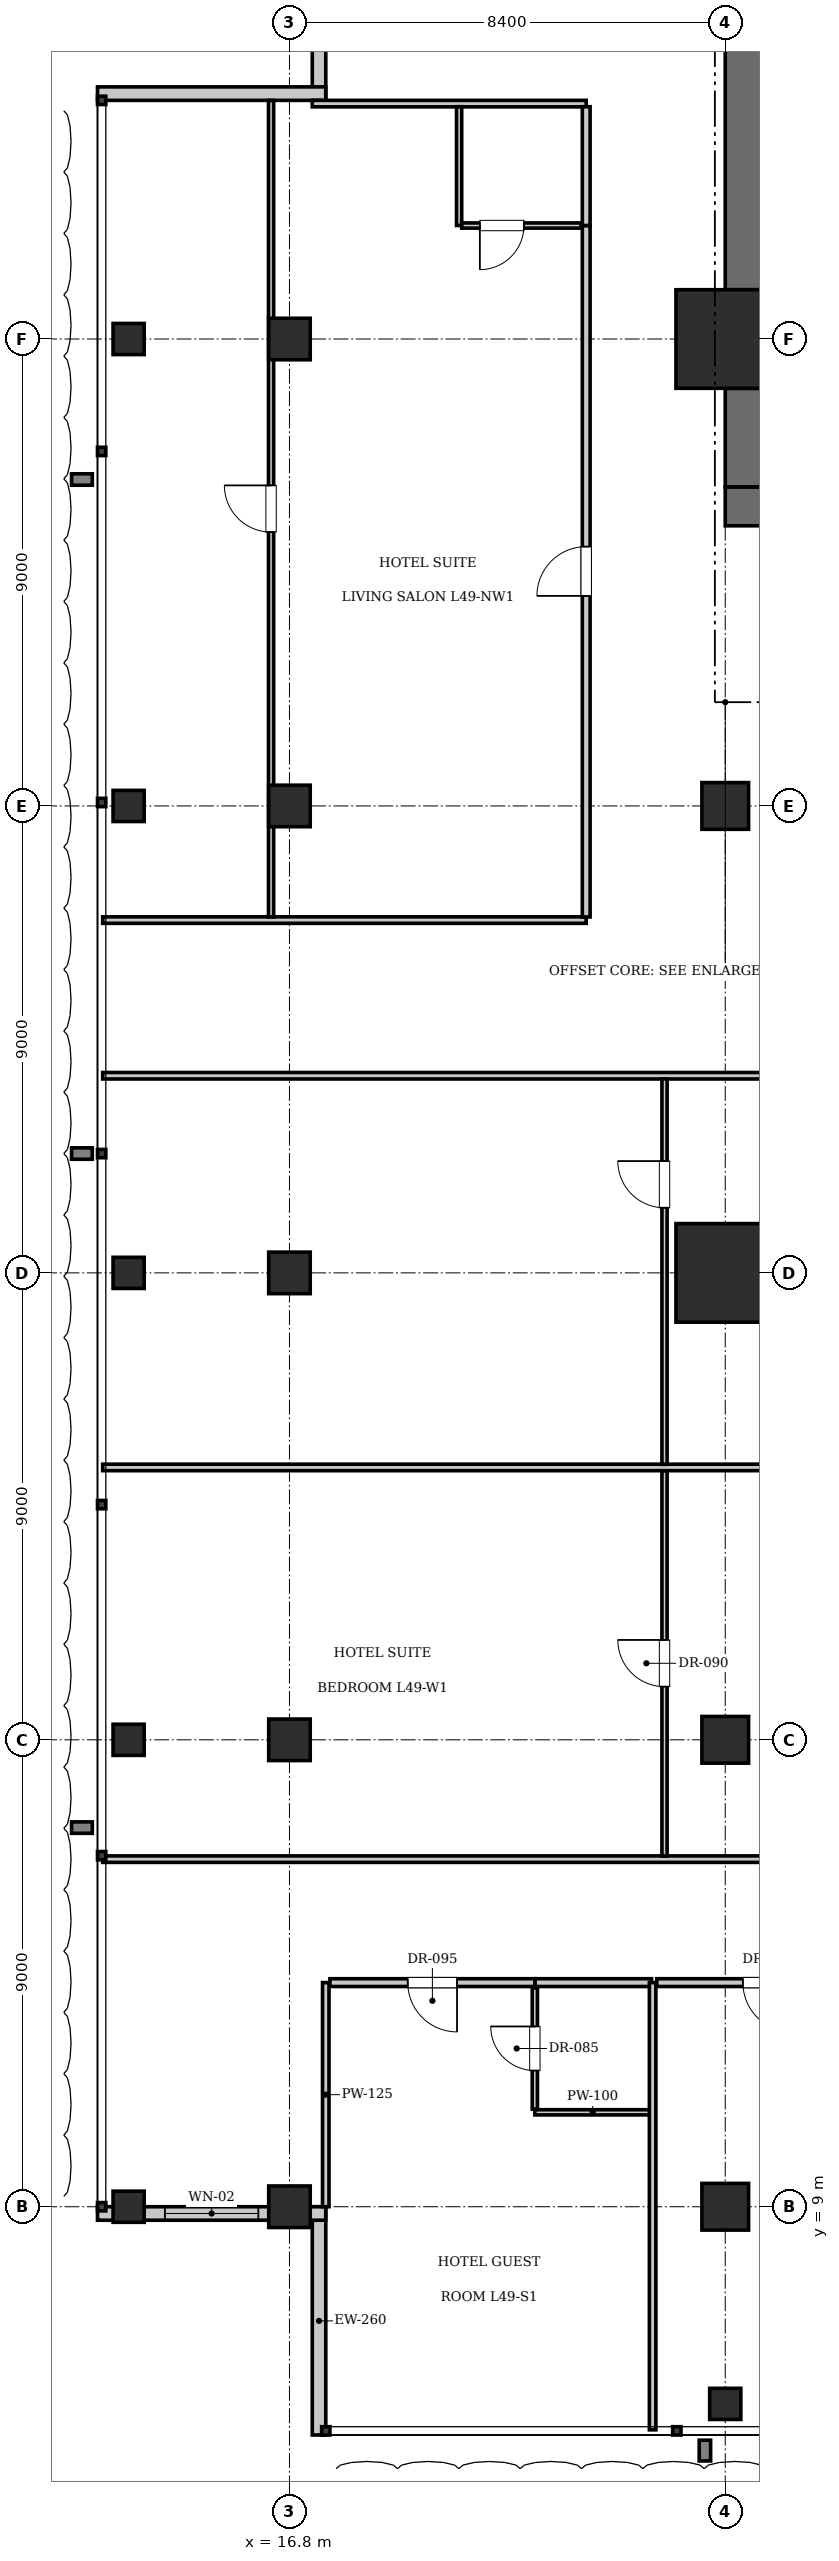
"""IFC4 building model, lengths in metres.
Left out: names, types, materials, properties, quantities, classifications, styles, units other than length and angle.
Written with IfcOpenShell. Run it as: python <this file> out.ifc"""

import sys

from ifc_helpers import new_model, si_unit, direction, frame, frame_2d, origin, origin_2d, place, context, subcontext, project, spatial, rectangle, i_section, extrude, element, fill, save


model = new_model("IFC4")
c1 = context("Model", 3, precision=1e-05, world=origin(), true_north=direction((0.0, 1.0)))
c2 = subcontext(c1, "Body", "Model", "MODEL_VIEW")
j1 = project(units=[si_unit("LENGTHUNIT", "METRE"), si_unit("PLANEANGLEUNIT", "RADIAN")], contexts=[c1])
p1 = place(None, origin())
s1 = spatial("IfcSite", under=j1, at=p1, CompositionType="ELEMENT")
p2 = place(p1, origin())
s2 = spatial("IfcBuilding", under=s1, at=p2, CompositionType="ELEMENT")
p3 = place(p2, frame((0.0, 0.0, 200.55)))
s3 = spatial("IfcBuildingStorey", under=s2, at=p3, CompositionType="ELEMENT", Elevation=200.55)
for number, where, z_axis, x_axis in (
    (1, (25.2, 27.0, 0.0), (0.0, 0.0, 1.0), (1.0, 0.0, 0.0)),
    (2, (25.2, 45.0, 0.0), (0.0, 0.0, 1.0), (1.0, 0.0, 0.0)),
):
    element("IfcColumn", number, at=place(p3, frame(where, z_axis=z_axis, x_axis=x_axis)), inside=s3, PredefinedType="COLUMN", context=c2, shape_type="SweptSolid", body=[
        extrude(rectangle(XDim=1.9, YDim=1.9, at=origin_2d()), origin(), (0.0, 0.0, 1.0), 3.85),
    ])
p4 = place(p3, frame((25.2, 41.775, 0.0), z_axis=(0.0, 0.0, 1.0), x_axis=(1.0, 0.0, 0.0)))
e3 = element("IfcWall", 3, at=p4, inside=s3, PredefinedType="SHEAR", context=c2, shape_type="SweptSolid", body=[
    extrude(rectangle(XDim=6.8, YDim=0.75, at=frame_2d((3.4, 0.0))), origin(), (0.0, 0.0, 1.0), 3.85),
])
p5 = place(p4, frame((1.65, 0.0, 0.0)))
e4 = element("IfcOpeningElement", 4, at=p5, cuts=e3, PredefinedType="OPENING", context=c2, shape_type="SweptSolid", body=[
    extrude(rectangle(XDim=1.15, YDim=2.15, at=frame_2d((0.575, 1.075))), frame((0.0, 0.385, 0.0), z_axis=(0.0, -1.0, 0.0), x_axis=(1.0, 0.0, 0.0)), (0.0, 0.0, 1.0), 0.77),
])
p6 = place(p4, frame((5.15, 0.0, 0.0)))
e5 = element("IfcOpeningElement", 5, at=p6, cuts=e3, PredefinedType="OPENING", context=c2, shape_type="SweptSolid", body=[
    extrude(rectangle(XDim=1.1, YDim=2.2, at=frame_2d((0.55, 1.1))), frame((0.0, 0.385, 0.0), z_axis=(0.0, -1.0, 0.0), x_axis=(1.0, 0.0, 0.0)), (0.0, 0.0, 1.0), 0.77),
])
p7 = place(p3, frame((25.575, 42.15, 0.0), z_axis=(0.0, 0.0, 1.0), x_axis=(0.0, 1.0, 0.0)))
e6 = element("IfcWall", 6, at=p7, inside=s3, PredefinedType="SHEAR", context=c2, shape_type="SweptSolid", body=[
    extrude(rectangle(XDim=1.9, YDim=0.75, at=frame_2d((0.95, 0.0))), origin(), (0.0, 0.0, 1.0), 3.85),
])
p8 = place(p3, frame((25.575, 45.95, 0.0), z_axis=(0.0, 0.0, 1.0), x_axis=(0.0, 1.0, 0.0)))
e7 = element("IfcWall", 7, at=p8, inside=s3, PredefinedType="SHEAR", context=c2, shape_type="SweptSolid", body=[
    extrude(rectangle(XDim=7.3, YDim=0.75, at=frame_2d((3.65, 0.0))), origin(), (0.0, 0.0, 1.0), 3.85),
])
for number, where, z_axis, x_axis in (
    (8, (25.2, 36.0, 0.0), (0.0, 0.0, 1.0), (1.0, 0.0, 0.0)),
    (9, (25.2, 18.0, 0.0), (0.0, 0.0, 1.0), (1.0, 0.0, 0.0)),
    (10, (25.2, 9.0, 0.0), (0.0, 0.0, 1.0), (1.0, 0.0, 0.0)),
):
    element("IfcColumn", number, at=place(p3, frame(where, z_axis=z_axis, x_axis=x_axis)), inside=s3, PredefinedType="COLUMN", context=c2, shape_type="SweptSolid", body=[
        extrude(rectangle(XDim=0.9, YDim=0.9, at=origin_2d()), origin(), (0.0, 0.0, 1.0), 3.85),
    ])
for number, where, z_axis, x_axis in (
    (11, (16.8, 9.0, 0.0), (0.0, 0.0, 1.0), (1.0, 0.0, 0.0)),
    (12, (16.8, 18.0, 0.0), (0.0, 0.0, 1.0), (1.0, 0.0, 0.0)),
    (13, (16.8, 27.0, 0.0), (0.0, 0.0, 1.0), (1.0, 0.0, 0.0)),
    (14, (16.8, 36.0, 0.0), (0.0, 0.0, 1.0), (1.0, 0.0, 0.0)),
    (15, (16.8, 45.0, 0.0), (0.0, 0.0, 1.0), (1.0, 0.0, 0.0)),
):
    element("IfcColumn", number, at=place(p3, frame(where, z_axis=z_axis, x_axis=x_axis)), inside=s3, PredefinedType="COLUMN", context=c2, shape_type="SweptSolid", body=[
        extrude(rectangle(XDim=0.8, YDim=0.8, at=origin_2d()), origin(), (0.0, 0.0, 1.0), 3.85),
    ])
for number, where, z_axis, x_axis in (
    (16, (13.7, 9.0, 0.0), (0.0, 0.0, 1.0), (1.0, 0.0, 0.0)),
    (17, (13.7, 18.0, 0.0), (0.0, 0.0, 1.0), (1.0, 0.0, 0.0)),
    (18, (13.7, 27.0, 0.0), (0.0, 0.0, 1.0), (1.0, 0.0, 0.0)),
    (19, (13.7, 36.0, 0.0), (0.0, 0.0, 1.0), (1.0, 0.0, 0.0)),
    (20, (13.7, 45.0, 0.0), (0.0, 0.0, 1.0), (1.0, 0.0, 0.0)),
    (21, (25.2, 5.2, 0.0), (0.0, 0.0, 1.0), (1.0, 0.0, 0.0)),
):
    element("IfcColumn", number, at=place(p3, frame(where, z_axis=z_axis, x_axis=x_axis)), inside=s3, PredefinedType="COLUMN", context=c2, shape_type="SweptSolid", body=[
        extrude(i_section(OverallWidth=0.6, OverallDepth=0.6, WebThickness=0.025, FlangeThickness=0.038, at=origin_2d()), origin(), (0.0, 0.0, 1.0), 3.85),
    ])
p9 = place(p3, frame((17.37, 4.6, 0.0), z_axis=(0.0, 0.0, 1.0), x_axis=(0.0, 1.0, 0.0)))
e22 = element("IfcWall", 22, at=p9, inside=s3, PredefinedType="SOLIDWALL", context=c2, shape_type="SweptSolid", body=[
    extrude(rectangle(XDim=4.4, YDim=0.26, at=frame_2d((2.2, 0.0))), origin(), (0.0, 0.0, 1.0), 3.61),
])
p10 = place(p3, frame((17.5, 8.87, 0.0), z_axis=(0.0, 0.0, 1.0), x_axis=(-1.0, 0.0, 0.0)))
e23 = element("IfcWall", 23, at=p10, inside=s3, PredefinedType="SOLIDWALL", context=c2, shape_type="SweptSolid", body=[
    extrude(rectangle(XDim=4.4, YDim=0.26, at=frame_2d((2.2, 0.0))), origin(), (0.0, 0.0, 1.0), 3.071),
])
p11 = place(p10, frame((1.3, 0.0, 0.9)))
e24 = element("IfcOpeningElement", 24, at=p11, cuts=e23, PredefinedType="OPENING", context=c2, shape_type="SweptSolid", body=[
    extrude(rectangle(XDim=1.8, YDim=2.1, at=frame_2d((0.9, 1.05))), frame((0.0, 0.14, 0.0), z_axis=(0.0, -1.0, 0.0), x_axis=(1.0, 0.0, 0.0)), (0.0, 0.0, 1.0), 0.28),
])
for number, where, z_axis, x_axis in (
    (25, (17.37, 49.6, 0.0), (0.0, 0.0, 1.0), (0.0, 1.0, 0.0)),
    (26, (13.1, 49.73, 0.0), (0.0, 0.0, 1.0), (1.0, 0.0, 0.0)),
):
    element("IfcWall", number, at=place(p3, frame(where, z_axis=z_axis, x_axis=x_axis)), inside=s3, PredefinedType="SOLIDWALL", context=c2, shape_type="SweptSolid", body=[
        extrude(rectangle(XDim=4.4, YDim=0.26, at=frame_2d((2.2, 0.0))), origin(), (0.0, 0.0, 1.0), 3.61),
    ])
p12 = place(p3, frame((17.5, 9.0, 0.0), z_axis=(0.0, 0.0, 1.0), x_axis=(0.0, 1.0, 0.0)))
e27 = element("IfcWall", 27, at=p12, inside=s3, PredefinedType="PARTITIONING", context=c2, shape_type="SweptSolid", body=[
    extrude(rectangle(XDim=4.32, YDim=0.125, at=frame_2d((2.16, 0.0))), origin(), (0.0, 0.0, 1.0), 3.61),
])
p13 = place(p3, frame((21.53, 13.32, 0.0), z_axis=(0.0, 0.0, 1.0), x_axis=(1.0, 0.0, 0.0)))
e28 = element("IfcWall", 28, at=p13, inside=s3, PredefinedType="PARTITIONING", context=c2, shape_type="SweptSolid", body=[
    extrude(rectangle(XDim=2.25, YDim=0.15, at=frame_2d((1.125, 0.0))), origin(), (0.0, 0.0, 1.0), 3.61),
])
p14 = place(p3, frame((21.53, 10.82, 0.0), z_axis=(0.0, 0.0, 1.0), x_axis=(1.0, 0.0, 0.0)))
e29 = element("IfcWall", 29, at=p14, inside=s3, PredefinedType="PARTITIONING", context=c2, shape_type="SweptSolid", body=[
    extrude(rectangle(XDim=2.23, YDim=0.1, at=frame_2d((1.115, 0.0))), origin(), (0.0, 0.0, 1.0), 3.61),
])
p15 = place(p3, frame((21.53, 10.88, 0.0), z_axis=(0.0, 0.0, 1.0), x_axis=(0.0, 1.0, 0.0)))
e30 = element("IfcWall", 30, at=p15, inside=s3, PredefinedType="PARTITIONING", context=c2, shape_type="SweptSolid", body=[
    extrude(rectangle(XDim=2.34, YDim=0.1, at=frame_2d((1.17, 0.0))), origin(), (0.0, 0.0, 1.0), 3.61),
])
p16 = place(p15, frame((0.745, 0.0, 0.0)))
e31 = element("IfcOpeningElement", 31, at=p16, cuts=e30, PredefinedType="OPENING", context=c2, shape_type="SweptSolid", body=[
    extrude(rectangle(XDim=0.85, YDim=2.1, at=frame_2d((0.425, 1.05))), frame((0.0, 0.06, 0.0), z_axis=(0.0, -1.0, 0.0), x_axis=(1.0, 0.0, 0.0)), (0.0, 0.0, 1.0), 0.12),
])
p17 = place(p3, frame((17.58, 13.32, 0.0), z_axis=(0.0, 0.0, 1.0), x_axis=(1.0, 0.0, 0.0)))
e32 = element("IfcWall", 32, at=p17, inside=s3, PredefinedType="PARTITIONING", context=c2, shape_type="SweptSolid", body=[
    extrude(rectangle(XDim=3.95, YDim=0.15, at=frame_2d((1.975, 0.0))), origin(), (0.0, 0.0, 1.0), 3.61),
])
p18 = place(p17, frame((1.5, 0.0, 0.0)))
e33 = element("IfcOpeningElement", 33, at=p18, cuts=e32, PredefinedType="OPENING", context=c2, shape_type="SweptSolid", body=[
    extrude(rectangle(XDim=0.95, YDim=2.15, at=frame_2d((0.475, 1.075))), frame((0.0, 0.085, 0.0), z_axis=(0.0, -1.0, 0.0), x_axis=(1.0, 0.0, 0.0)), (0.0, 0.0, 1.0), 0.17),
])
p19 = place(p3, frame((23.8, 4.7, 0.0), z_axis=(0.0, 0.0, 1.0), x_axis=(0.0, 1.0, 0.0)))
e34 = element("IfcWall", 34, at=p19, inside=s3, PredefinedType="PARTITIONING", context=c2, shape_type="SweptSolid", body=[
    extrude(rectangle(XDim=8.62, YDim=0.125, at=frame_2d((4.31, 0.0))), origin(), (0.0, 0.0, 1.0), 3.61),
])
p20 = place(p3, frame((23.88, 13.32, 0.0), z_axis=(0.0, 0.0, 1.0), x_axis=(1.0, 0.0, 0.0)))
e35 = element("IfcWall", 35, at=p20, inside=s3, PredefinedType="PARTITIONING", context=c2, shape_type="SweptSolid", body=[
    extrude(rectangle(XDim=4.27, YDim=0.15, at=frame_2d((2.135, 0.0))), origin(), (0.0, 0.0, 1.0), 3.61),
])
p21 = place(p20, frame((1.66, 0.0, 0.0)))
e36 = element("IfcOpeningElement", 36, at=p21, cuts=e35, PredefinedType="OPENING", context=c2, shape_type="SweptSolid", body=[
    extrude(rectangle(XDim=0.95, YDim=2.15, at=frame_2d((0.475, 1.075))), frame((0.0, 0.085, 0.0), z_axis=(0.0, -1.0, 0.0), x_axis=(1.0, 0.0, 0.0)), (0.0, 0.0, 1.0), 0.17),
])
for number, where, z_axis, x_axis in (
    (37, (13.2, 15.7, 0.0), (0.0, 0.0, 1.0), (1.0, 0.0, 0.0)),
    (38, (13.2, 30.8, 0.0), (0.0, 0.0, 1.0), (1.0, 0.0, 0.0)),
):
    element("IfcWall", number, at=place(p3, frame(where, z_axis=z_axis, x_axis=x_axis)), inside=s3, PredefinedType="PARTITIONING", context=c2, shape_type="SweptSolid", body=[
        extrude(rectangle(XDim=25.12, YDim=0.125, at=frame_2d((12.56, 0.0))), origin(), (0.0, 0.0, 1.0), 3.61),
    ])
p22 = place(p3, frame((24.03, 15.76, 0.0), z_axis=(0.0, 0.0, 1.0), x_axis=(0.0, 1.0, 0.0)))
e39 = element("IfcWall", 39, at=p22, inside=s3, PredefinedType="PARTITIONING", context=c2, shape_type="SweptSolid", body=[
    extrude(rectangle(XDim=7.43, YDim=0.1, at=frame_2d((3.715, 0.0))), origin(), (0.0, 0.0, 1.0), 3.61),
])
p23 = place(p22, frame((3.265, 0.0, 0.0)))
e40 = element("IfcOpeningElement", 40, at=p23, cuts=e39, PredefinedType="OPENING", context=c2, shape_type="SweptSolid", body=[
    extrude(rectangle(XDim=0.9, YDim=2.1, at=frame_2d((0.45, 1.05))), frame((0.0, 0.06, 0.0), z_axis=(0.0, -1.0, 0.0), x_axis=(1.0, 0.0, 0.0)), (0.0, 0.0, 1.0), 0.12),
])
p24 = place(p3, frame((13.2, 23.25, 0.0), z_axis=(0.0, 0.0, 1.0), x_axis=(1.0, 0.0, 0.0)))
e41 = element("IfcWall", 41, at=p24, inside=s3, PredefinedType="PARTITIONING", context=c2, shape_type="SweptSolid", body=[
    extrude(rectangle(XDim=25.12, YDim=0.125, at=frame_2d((12.56, 0.0))), origin(), (0.0, 0.0, 1.0), 3.61),
])
p25 = place(p3, frame((24.03, 23.31, 0.0), z_axis=(0.0, 0.0, 1.0), x_axis=(0.0, 1.0, 0.0)))
e42 = element("IfcWall", 42, at=p25, inside=s3, PredefinedType="PARTITIONING", context=c2, shape_type="SweptSolid", body=[
    extrude(rectangle(XDim=7.43, YDim=0.1, at=frame_2d((3.715, 0.0))), origin(), (0.0, 0.0, 1.0), 3.61),
])
p26 = place(p25, frame((4.945, 0.0, 0.0)))
e43 = element("IfcOpeningElement", 43, at=p26, cuts=e42, PredefinedType="OPENING", context=c2, shape_type="SweptSolid", body=[
    extrude(rectangle(XDim=0.9, YDim=2.1, at=frame_2d((0.45, 1.05))), frame((0.0, 0.06, 0.0), z_axis=(0.0, -1.0, 0.0), x_axis=(1.0, 0.0, 0.0)), (0.0, 0.0, 1.0), 0.12),
])
p27 = place(p3, frame((13.2, 33.8, 0.0), z_axis=(0.0, 0.0, 1.0), x_axis=(1.0, 0.0, 0.0)))
e44 = element("IfcWall", 44, at=p27, inside=s3, PredefinedType="PARTITIONING", context=c2, shape_type="SweptSolid", body=[
    extrude(rectangle(XDim=9.32, YDim=0.125, at=frame_2d((4.66, 0.0))), origin(), (0.0, 0.0, 1.0), 3.61),
])
p28 = place(p3, frame((17.24, 49.538, 0.0), z_axis=(0.0, 0.0, 1.0), x_axis=(1.0, 0.0, 0.0)))
e45 = element("IfcWall", 45, at=p28, inside=s3, PredefinedType="PARTITIONING", context=c2, shape_type="SweptSolid", body=[
    extrude(rectangle(XDim=5.28, YDim=0.125, at=frame_2d((2.64, 0.0))), origin(), (0.0, 0.0, 1.0), 3.61),
])
p29 = place(p3, frame((22.52, 33.86, 0.0), z_axis=(0.0, 0.0, 1.0), x_axis=(0.0, 1.0, 0.0)))
e46 = element("IfcWall", 46, at=p29, inside=s3, PredefinedType="PARTITIONING", context=c2, shape_type="SweptSolid", body=[
    extrude(rectangle(XDim=13.327, YDim=0.15, at=frame_2d((6.664, 0.0))), origin(), (0.0, 0.0, 1.0), 3.61),
])
p30 = place(p29, frame((6.189, 0.0, 0.0)))
e47 = element("IfcOpeningElement", 47, at=p30, cuts=e46, PredefinedType="OPENING", context=c2, shape_type="SweptSolid", body=[
    extrude(rectangle(XDim=0.95, YDim=2.15, at=frame_2d((0.475, 1.075))), frame((0.0, 0.085, 0.0), z_axis=(0.0, -1.0, 0.0), x_axis=(1.0, 0.0, 0.0)), (0.0, 0.0, 1.0), 0.17),
])
p31 = place(p3, frame((22.52, 47.188, 0.0), z_axis=(0.0, 0.0, 1.0), x_axis=(0.0, 1.0, 0.0)))
e48 = element("IfcWall", 48, at=p31, inside=s3, PredefinedType="PARTITIONING", context=c2, shape_type="SweptSolid", body=[
    extrude(rectangle(XDim=2.29, YDim=0.15, at=frame_2d((1.145, 0.0))), origin(), (0.0, 0.0, 1.0), 3.61),
])
p32 = place(p3, frame((20.07, 47.188, 0.0), z_axis=(0.0, 0.0, 1.0), x_axis=(0.0, 1.0, 0.0)))
e49 = element("IfcWall", 49, at=p32, inside=s3, PredefinedType="PARTITIONING", context=c2, shape_type="SweptSolid", body=[
    extrude(rectangle(XDim=2.29, YDim=0.1, at=frame_2d((1.145, 0.0))), origin(), (0.0, 0.0, 1.0), 3.61),
])
p33 = place(p3, frame((20.12, 47.188, 0.0), z_axis=(0.0, 0.0, 1.0), x_axis=(1.0, 0.0, 0.0)))
e50 = element("IfcWall", 50, at=p33, inside=s3, PredefinedType="PARTITIONING", context=c2, shape_type="SweptSolid", body=[
    extrude(rectangle(XDim=2.3, YDim=0.1, at=frame_2d((1.15, 0.0))), origin(), (0.0, 0.0, 1.0), 3.61),
])
p34 = place(p33, frame((0.35, 0.0, 0.0)))
e51 = element("IfcOpeningElement", 51, at=p34, cuts=e50, PredefinedType="OPENING", context=c2, shape_type="SweptSolid", body=[
    extrude(rectangle(XDim=0.85, YDim=2.1, at=frame_2d((0.425, 1.05))), frame((0.0, 0.06, 0.0), z_axis=(0.0, -1.0, 0.0), x_axis=(1.0, 0.0, 0.0)), (0.0, 0.0, 1.0), 0.12),
])
p35 = place(p3, frame((16.446, 33.86, 0.0), z_axis=(0.0, 0.0, 1.0), x_axis=(0.0, 1.0, 0.0)))
e52 = element("IfcWall", 52, at=p35, inside=s3, PredefinedType="PARTITIONING", context=c2, shape_type="SweptSolid", body=[
    extrude(rectangle(XDim=15.737, YDim=0.1, at=frame_2d((7.869, 0.0))), origin(), (0.0, 0.0, 1.0), 3.61),
])
p36 = place(p35, frame((7.419, 0.0, 0.0)))
e53 = element("IfcOpeningElement", 53, at=p36, cuts=e52, PredefinedType="OPENING", context=c2, shape_type="SweptSolid", body=[
    extrude(rectangle(XDim=0.9, YDim=2.1, at=frame_2d((0.45, 1.05))), frame((0.0, 0.06, 0.0), z_axis=(0.0, -1.0, 0.0), x_axis=(1.0, 0.0, 0.0)), (0.0, 0.0, 1.0), 0.12),
])
p37 = place(p11, origin())
e54 = element("IfcWindow", 54, at=p37, inside=s3, PartitioningType="SINGLE_PANEL", PredefinedType="WINDOW", context=c2, shape_type="SweptSolid", body=[
    extrude(rectangle(XDim=1.8, YDim=2.1, at=frame_2d((0.9, 1.05))), frame((0.0, 0.03, 0.0), z_axis=(0.0, -1.0, 0.0), x_axis=(1.0, 0.0, 0.0)), (0.0, 0.0, 1.0), 0.06),
])
fill(e24, e54)
p38 = place(p16, origin())
e55 = element("IfcDoor", 55, at=p38, inside=s3, OperationType="SINGLE_SWING_RIGHT", PredefinedType="DOOR", context=c2, shape_type="SweptSolid", body=[
    extrude(rectangle(XDim=0.85, YDim=2.1, at=frame_2d((0.425, 1.05))), frame((0.0, 0.025, 0.0), z_axis=(0.0, -1.0, 0.0), x_axis=(1.0, 0.0, 0.0)), (0.0, 0.0, 1.0), 0.05),
])
fill(e31, e55)
p39 = place(p18, frame((0.95, 0.0, 0.0), z_axis=(0.0, 0.0, 1.0), x_axis=(-1.0, 0.0, 0.0)))
e56 = element("IfcDoor", 56, at=p39, inside=s3, OperationType="SINGLE_SWING_LEFT", PredefinedType="DOOR", context=c2, shape_type="SweptSolid", body=[
    extrude(rectangle(XDim=0.95, YDim=2.15, at=frame_2d((0.475, 1.075))), frame((0.0, 0.025, 0.0), z_axis=(0.0, -1.0, 0.0), x_axis=(1.0, 0.0, 0.0)), (0.0, 0.0, 1.0), 0.05),
])
fill(e33, e56)
p40 = place(p21, frame((0.95, 0.0, 0.0), z_axis=(0.0, 0.0, 1.0), x_axis=(-1.0, 0.0, 0.0)))
e57 = element("IfcDoor", 57, at=p40, inside=s3, OperationType="SINGLE_SWING_LEFT", PredefinedType="DOOR", context=c2, shape_type="SweptSolid", body=[
    extrude(rectangle(XDim=0.95, YDim=2.15, at=frame_2d((0.475, 1.075))), frame((0.0, 0.025, 0.0), z_axis=(0.0, -1.0, 0.0), x_axis=(1.0, 0.0, 0.0)), (0.0, 0.0, 1.0), 0.05),
])
fill(e36, e57)
p41 = place(p23, origin())
e58 = element("IfcDoor", 58, at=p41, inside=s3, OperationType="SINGLE_SWING_RIGHT", PredefinedType="DOOR", context=c2, shape_type="SweptSolid", body=[
    extrude(rectangle(XDim=0.9, YDim=2.1, at=frame_2d((0.45, 1.05))), frame((0.0, 0.025, 0.0), z_axis=(0.0, -1.0, 0.0), x_axis=(1.0, 0.0, 0.0)), (0.0, 0.0, 1.0), 0.05),
])
fill(e40, e58)
p42 = place(p26, origin())
e59 = element("IfcDoor", 59, at=p42, inside=s3, OperationType="SINGLE_SWING_RIGHT", PredefinedType="DOOR", context=c2, shape_type="SweptSolid", body=[
    extrude(rectangle(XDim=0.9, YDim=2.1, at=frame_2d((0.45, 1.05))), frame((0.0, 0.025, 0.0), z_axis=(0.0, -1.0, 0.0), x_axis=(1.0, 0.0, 0.0)), (0.0, 0.0, 1.0), 0.05),
])
fill(e43, e59)
p43 = place(p34, frame((0.85, 0.0, 0.0), z_axis=(0.0, 0.0, 1.0), x_axis=(-1.0, 0.0, 0.0)))
e60 = element("IfcDoor", 60, at=p43, inside=s3, OperationType="SINGLE_SWING_RIGHT", PredefinedType="DOOR", context=c2, shape_type="SweptSolid", body=[
    extrude(rectangle(XDim=0.85, YDim=2.1, at=frame_2d((0.425, 1.05))), frame((0.0, 0.025, 0.0), z_axis=(0.0, -1.0, 0.0), x_axis=(1.0, 0.0, 0.0)), (0.0, 0.0, 1.0), 0.05),
])
fill(e51, e60)
p44 = place(p30, origin())
e61 = element("IfcDoor", 61, at=p44, inside=s3, OperationType="SINGLE_SWING_LEFT", PredefinedType="DOOR", context=c2, shape_type="SweptSolid", body=[
    extrude(rectangle(XDim=0.95, YDim=2.15, at=frame_2d((0.475, 1.075))), frame((0.0, 0.025, 0.0), z_axis=(0.0, -1.0, 0.0), x_axis=(1.0, 0.0, 0.0)), (0.0, 0.0, 1.0), 0.05),
])
fill(e47, e61)
p45 = place(p36, origin())
e62 = element("IfcDoor", 62, at=p45, inside=s3, OperationType="SINGLE_SWING_RIGHT", PredefinedType="DOOR", context=c2, shape_type="SweptSolid", body=[
    extrude(rectangle(XDim=0.9, YDim=2.1, at=frame_2d((0.45, 1.05))), frame((0.0, 0.025, 0.0), z_axis=(0.0, -1.0, 0.0), x_axis=(1.0, 0.0, 0.0)), (0.0, 0.0, 1.0), 0.05),
])
fill(e53, e62)
save(model, sys.argv[1])
